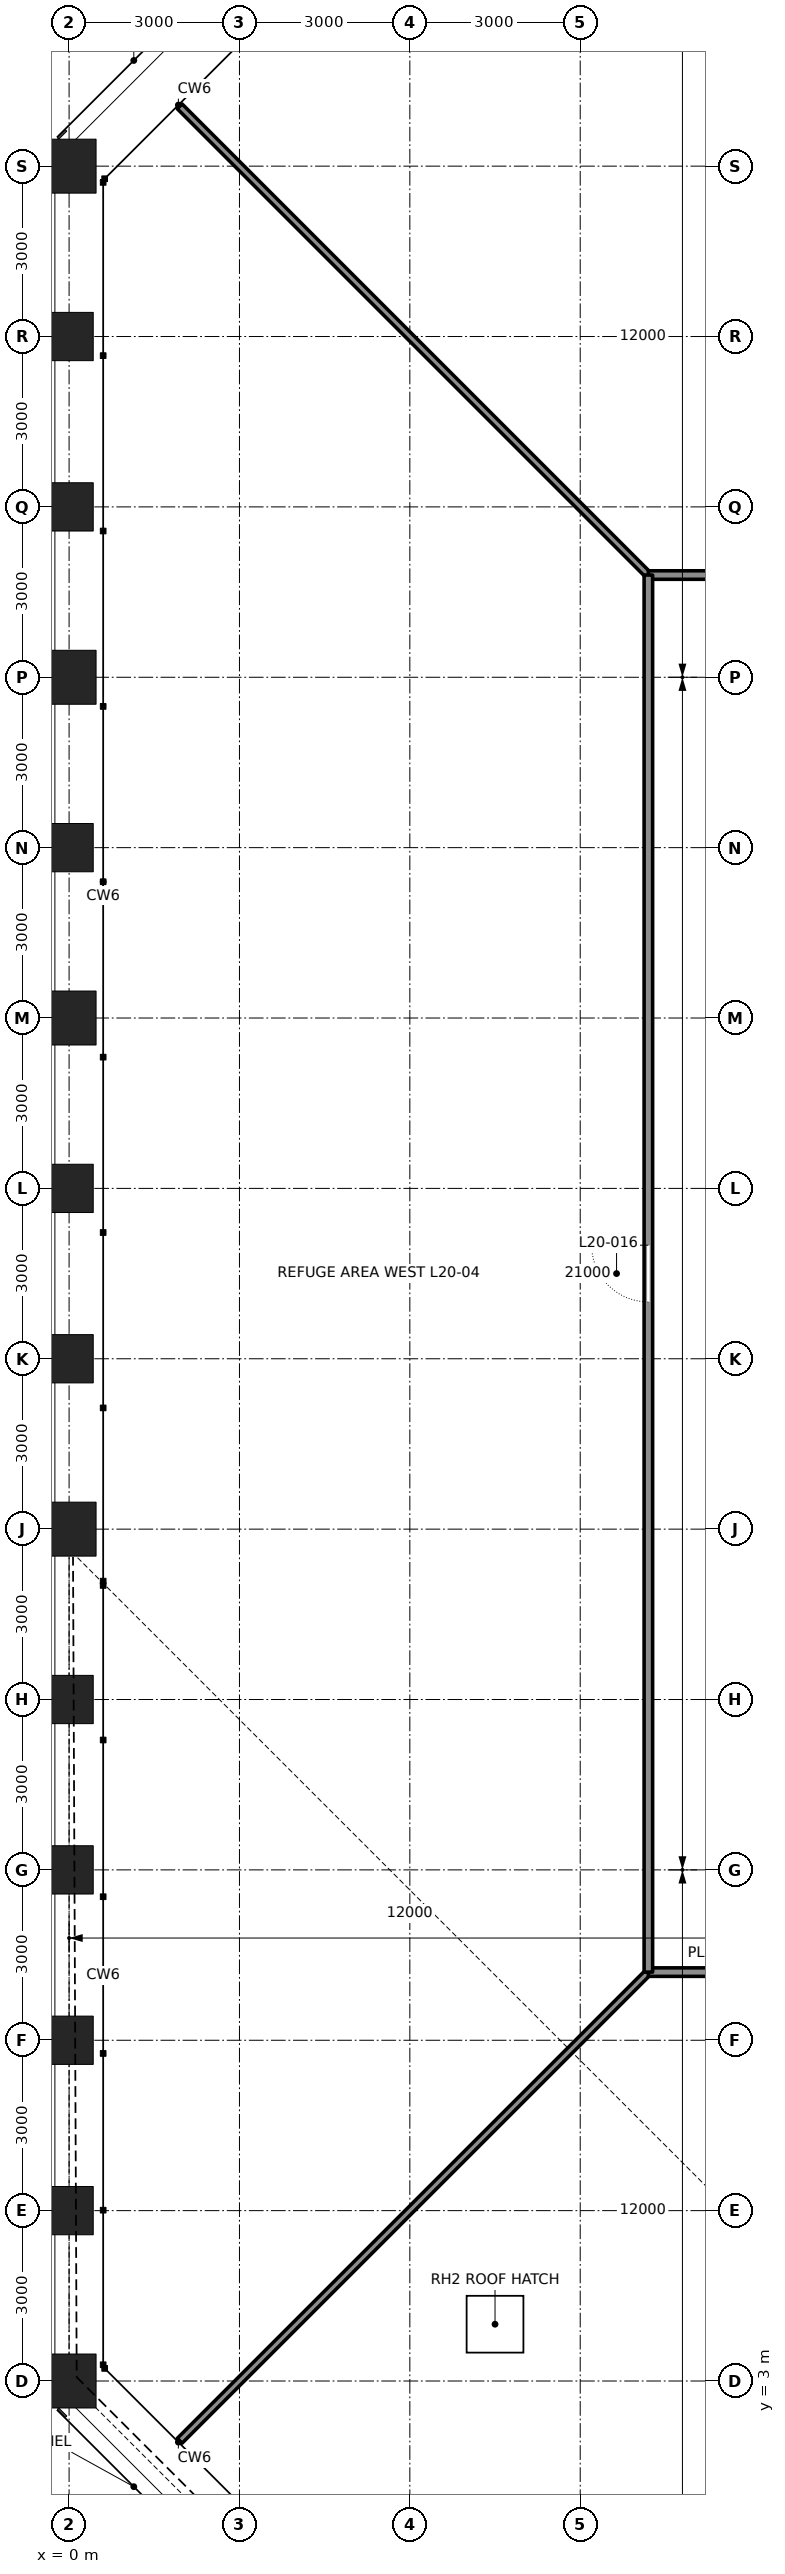
"""IFC4 building model, lengths in metres.
Left out: names, types, materials, properties, quantities, classifications, styles, units other than length and angle.
Written with IfcOpenShell. Run it as: python <this file> out.ifc"""

import sys

from ifc_helpers import new_model, si_unit, direction, frame, frame_2d, origin, origin_2d, place, context, subcontext, project, spatial, rectangle, hollow_rectangle, extrude, element, fill, save


model = new_model("IFC4")
c1 = context("Model", 3, precision=1e-05, world=origin(), true_north=direction((0.0, 1.0)))
c2 = subcontext(c1, "Body", "Model", "MODEL_VIEW")
j1 = project(units=[si_unit("LENGTHUNIT", "METRE"), si_unit("PLANEANGLEUNIT", "RADIAN")], contexts=[c1])
p1 = place(None, origin())
s1 = spatial("IfcSite", under=j1, at=p1, CompositionType="ELEMENT")
p2 = place(p1, origin())
s2 = spatial("IfcBuilding", under=s1, at=p2, CompositionType="ELEMENT")
p3 = place(p2, frame((0.0, 0.0, 96.3)))
s3 = spatial("IfcBuildingStorey", under=s2, at=p3, CompositionType="ELEMENT", Elevation=96.3)
p4 = place(p3, frame((0.0, 42.0, 0.0), z_axis=(0.0, 0.0, 1.0), x_axis=(-1.0, 0.0, 0.0)))
e1 = element("IfcColumn", 1, at=p4, inside=s3, PredefinedType="COLUMN", context=c2, shape_type="SweptSolid", body=[
    extrude(hollow_rectangle(XDim=0.95, YDim=0.95, WallThickness=0.095, at=origin_2d()), origin(), (0.0, 0.0, 1.0), 6.0),
])
for number, where, z_axis, x_axis in (
    (2, (0.0, 39.0, 0.0), (0.0, 0.0, 1.0), (-1.0, 0.0, 0.0)),
    (3, (0.0, 36.0, 0.0), (0.0, 0.0, 1.0), (-1.0, 0.0, 0.0)),
):
    element("IfcColumn", number, at=place(p3, frame(where, z_axis=z_axis, x_axis=x_axis)), inside=s3, PredefinedType="COLUMN", context=c2, shape_type="SweptSolid", body=[
        extrude(hollow_rectangle(XDim=0.85, YDim=0.85, WallThickness=0.085, at=origin_2d()), origin(), (0.0, 0.0, 1.0), 6.0),
    ])
p5 = place(p3, frame((0.0, 33.0, 0.0), z_axis=(0.0, 0.0, 1.0), x_axis=(-1.0, 0.0, 0.0)))
e4 = element("IfcColumn", 4, at=p5, inside=s3, PredefinedType="COLUMN", context=c2, shape_type="SweptSolid", body=[
    extrude(hollow_rectangle(XDim=0.95, YDim=0.95, WallThickness=0.11, at=origin_2d()), origin(), (0.0, 0.0, 1.0), 6.0),
])
p6 = place(p3, frame((0.0, 30.0, 0.0), z_axis=(0.0, 0.0, 1.0), x_axis=(-1.0, 0.0, 0.0)))
e5 = element("IfcColumn", 5, at=p6, inside=s3, PredefinedType="COLUMN", context=c2, shape_type="SweptSolid", body=[
    extrude(hollow_rectangle(XDim=0.85, YDim=0.85, WallThickness=0.085, at=origin_2d()), origin(), (0.0, 0.0, 1.0), 6.0),
])
p7 = place(p3, frame((0.0, 27.0, 0.0), z_axis=(0.0, 0.0, 1.0), x_axis=(-1.0, 0.0, 0.0)))
e6 = element("IfcColumn", 6, at=p7, inside=s3, PredefinedType="COLUMN", context=c2, shape_type="SweptSolid", body=[
    extrude(hollow_rectangle(XDim=0.95, YDim=0.95, WallThickness=0.11, at=origin_2d()), origin(), (0.0, 0.0, 1.0), 6.0),
])
for number, where, z_axis, x_axis in (
    (7, (0.0, 24.0, 0.0), (0.0, 0.0, 1.0), (-1.0, 0.0, 0.0)),
    (8, (0.0, 21.0, 0.0), (0.0, 0.0, 1.0), (-1.0, 0.0, 0.0)),
):
    element("IfcColumn", number, at=place(p3, frame(where, z_axis=z_axis, x_axis=x_axis)), inside=s3, PredefinedType="COLUMN", context=c2, shape_type="SweptSolid", body=[
        extrude(hollow_rectangle(XDim=0.85, YDim=0.85, WallThickness=0.085, at=origin_2d()), origin(), (0.0, 0.0, 1.0), 6.0),
    ])
p8 = place(p3, frame((0.0, 18.0, 0.0), z_axis=(0.0, 0.0, 1.0), x_axis=(-1.0, 0.0, 0.0)))
e9 = element("IfcColumn", 9, at=p8, inside=s3, PredefinedType="COLUMN", context=c2, shape_type="SweptSolid", body=[
    extrude(hollow_rectangle(XDim=0.95, YDim=0.95, WallThickness=0.11, at=origin_2d()), origin(), (0.0, 0.0, 1.0), 6.0),
])
p9 = place(p3, frame((0.0, 15.0, 0.0), z_axis=(0.0, 0.0, 1.0), x_axis=(-1.0, 0.0, 0.0)))
e10 = element("IfcColumn", 10, at=p9, inside=s3, PredefinedType="COLUMN", context=c2, shape_type="SweptSolid", body=[
    extrude(hollow_rectangle(XDim=0.85, YDim=0.85, WallThickness=0.085, at=origin_2d()), origin(), (0.0, 0.0, 1.0), 4.149),
])
p10 = place(p3, frame((0.0, 12.0, 0.0), z_axis=(0.0, 0.0, 1.0), x_axis=(-1.0, 0.0, 0.0)))
e11 = element("IfcColumn", 11, at=p10, inside=s3, PredefinedType="COLUMN", context=c2, shape_type="SweptSolid", body=[
    extrude(hollow_rectangle(XDim=0.85, YDim=0.85, WallThickness=0.085, at=origin_2d()), origin(), (0.0, 0.0, 1.0), 3.698),
])
p11 = place(p3, frame((0.0, 9.0, 0.0), z_axis=(0.0, 0.0, 1.0), x_axis=(-1.0, 0.0, 0.0)))
e12 = element("IfcColumn", 12, at=p11, inside=s3, PredefinedType="COLUMN", context=c2, shape_type="SweptSolid", body=[
    extrude(hollow_rectangle(XDim=0.85, YDim=0.85, WallThickness=0.085, at=origin_2d()), origin(), (0.0, 0.0, 1.0), 3.247),
])
p12 = place(p3, frame((0.0, 6.0, 0.0), z_axis=(0.0, 0.0, 1.0), x_axis=(-1.0, 0.0, 0.0)))
e13 = element("IfcColumn", 13, at=p12, inside=s3, PredefinedType="COLUMN", context=c2, shape_type="SweptSolid", body=[
    extrude(hollow_rectangle(XDim=0.85, YDim=0.85, WallThickness=0.085, at=origin_2d()), origin(), (0.0, 0.0, 1.0), 2.796),
])
p13 = place(p3, frame((0.0, 3.0, 0.0), z_axis=(0.0, 0.0, 1.0), x_axis=(-1.0, 0.0, 0.0)))
e14 = element("IfcColumn", 14, at=p13, inside=s3, PredefinedType="COLUMN", context=c2, shape_type="SweptSolid", body=[
    extrude(hollow_rectangle(XDim=0.95, YDim=0.95, WallThickness=0.095, at=origin_2d()), origin(), (0.0, 0.0, 1.0), 2.345),
])
for number, where, z_axis, x_axis in (
    (15, (10.2, 34.8, 0.0), (0.0, 0.0, 1.0), (-0.707, 0.707, 0.0)),
    (16, (10.2, 10.2, 0.0), (0.0, 0.0, 1.0), (-0.707, -0.707, 0.0)),
):
    element("IfcWall", number, at=place(p3, frame(where, z_axis=z_axis, x_axis=x_axis)), inside=s3, PredefinedType="PARTITIONING", context=c2, shape_type="SweptSolid", body=[
        extrude(rectangle(XDim=11.671, YDim=0.12, at=frame_2d((5.836, 0.0))), origin(), (0.0, 0.0, 1.0), 5.84),
    ])
p14 = place(p3, frame((10.2, 10.2, 0.0), z_axis=(0.0, 0.0, 1.0), x_axis=(1.0, 0.0, 0.0)))
e17 = element("IfcWall", 17, at=p14, inside=s3, PredefinedType="PARTITIONING", context=c2, shape_type="SweptSolid", body=[
    extrude(rectangle(XDim=24.6, YDim=0.15, at=frame_2d((12.3, 0.0))), origin(), (0.0, 0.0, 1.0), 5.84),
])
p15 = place(p14, frame((11.8, 0.0, 0.0)))
e18 = element("IfcOpeningElement", 18, at=p15, cuts=e17, PredefinedType="OPENING", context=c2, shape_type="SweptSolid", body=[
    extrude(rectangle(XDim=1.0, YDim=2.4, at=frame_2d((0.5, 1.2))), frame((0.0, 0.085, 0.0), z_axis=(0.0, -1.0, 0.0), x_axis=(1.0, 0.0, 0.0)), (0.0, 0.0, 1.0), 0.17),
])
p16 = place(p3, frame((10.2, 34.8, 0.0), z_axis=(0.0, 0.0, 1.0), x_axis=(1.0, 0.0, 0.0)))
e19 = element("IfcWall", 19, at=p16, inside=s3, PredefinedType="PARTITIONING", context=c2, shape_type="SweptSolid", body=[
    extrude(rectangle(XDim=24.6, YDim=0.15, at=frame_2d((12.3, 0.0))), origin(), (0.0, 0.0, 1.0), 5.84),
])
p17 = place(p16, frame((11.8, 0.0, 0.0)))
e20 = element("IfcOpeningElement", 20, at=p17, cuts=e19, PredefinedType="OPENING", context=c2, shape_type="SweptSolid", body=[
    extrude(rectangle(XDim=1.0, YDim=2.4, at=frame_2d((0.5, 1.2))), frame((0.0, 0.085, 0.0), z_axis=(0.0, -1.0, 0.0), x_axis=(1.0, 0.0, 0.0)), (0.0, 0.0, 1.0), 0.17),
])
p18 = place(p3, frame((10.2, 10.2, 0.0), z_axis=(0.0, 0.0, 1.0), x_axis=(0.0, 1.0, 0.0)))
e21 = element("IfcWall", 21, at=p18, inside=s3, PredefinedType="PARTITIONING", context=c2, shape_type="SweptSolid", body=[
    extrude(rectangle(XDim=24.6, YDim=0.15, at=frame_2d((12.3, 0.0))), origin(), (0.0, 0.0, 1.0), 5.84),
])
p19 = place(p18, frame((11.8, 0.0, 0.0)))
e22 = element("IfcOpeningElement", 22, at=p19, cuts=e21, PredefinedType="OPENING", context=c2, shape_type="SweptSolid", body=[
    extrude(rectangle(XDim=1.0, YDim=2.4, at=frame_2d((0.5, 1.2))), frame((0.0, 0.085, 0.0), z_axis=(0.0, -1.0, 0.0), x_axis=(1.0, 0.0, 0.0)), (0.0, 0.0, 1.0), 0.17),
])
p20 = place(p3, frame((7.5, 4.0, 4.519)))
p21 = place(p20, frame((0.0, 0.0, 0.454)))
e23 = element("IfcDoor", 23, at=p21, inside=s3, OperationType="SINGLE_SWING_LEFT", PredefinedType="TRAPDOOR", context=c2, shape_type="SweptSolid", body=[
    extrude(rectangle(XDim=1.0, YDim=1.0, at=origin_2d()), origin(), (0.0, 0.0, 1.0), 0.05),
])
p22 = place(p19, origin())
e24 = element("IfcDoor", 24, at=p22, inside=s3, OperationType="SINGLE_SWING_RIGHT", PredefinedType="DOOR", context=c2, shape_type="SweptSolid", body=[
    extrude(rectangle(XDim=1.0, YDim=2.4, at=frame_2d((0.5, 1.2))), frame((0.0, 0.025, 0.0), z_axis=(0.0, -1.0, 0.0), x_axis=(1.0, 0.0, 0.0)), (0.0, 0.0, 1.0), 0.05),
])
fill(e22, e24)
save(model, sys.argv[1])
